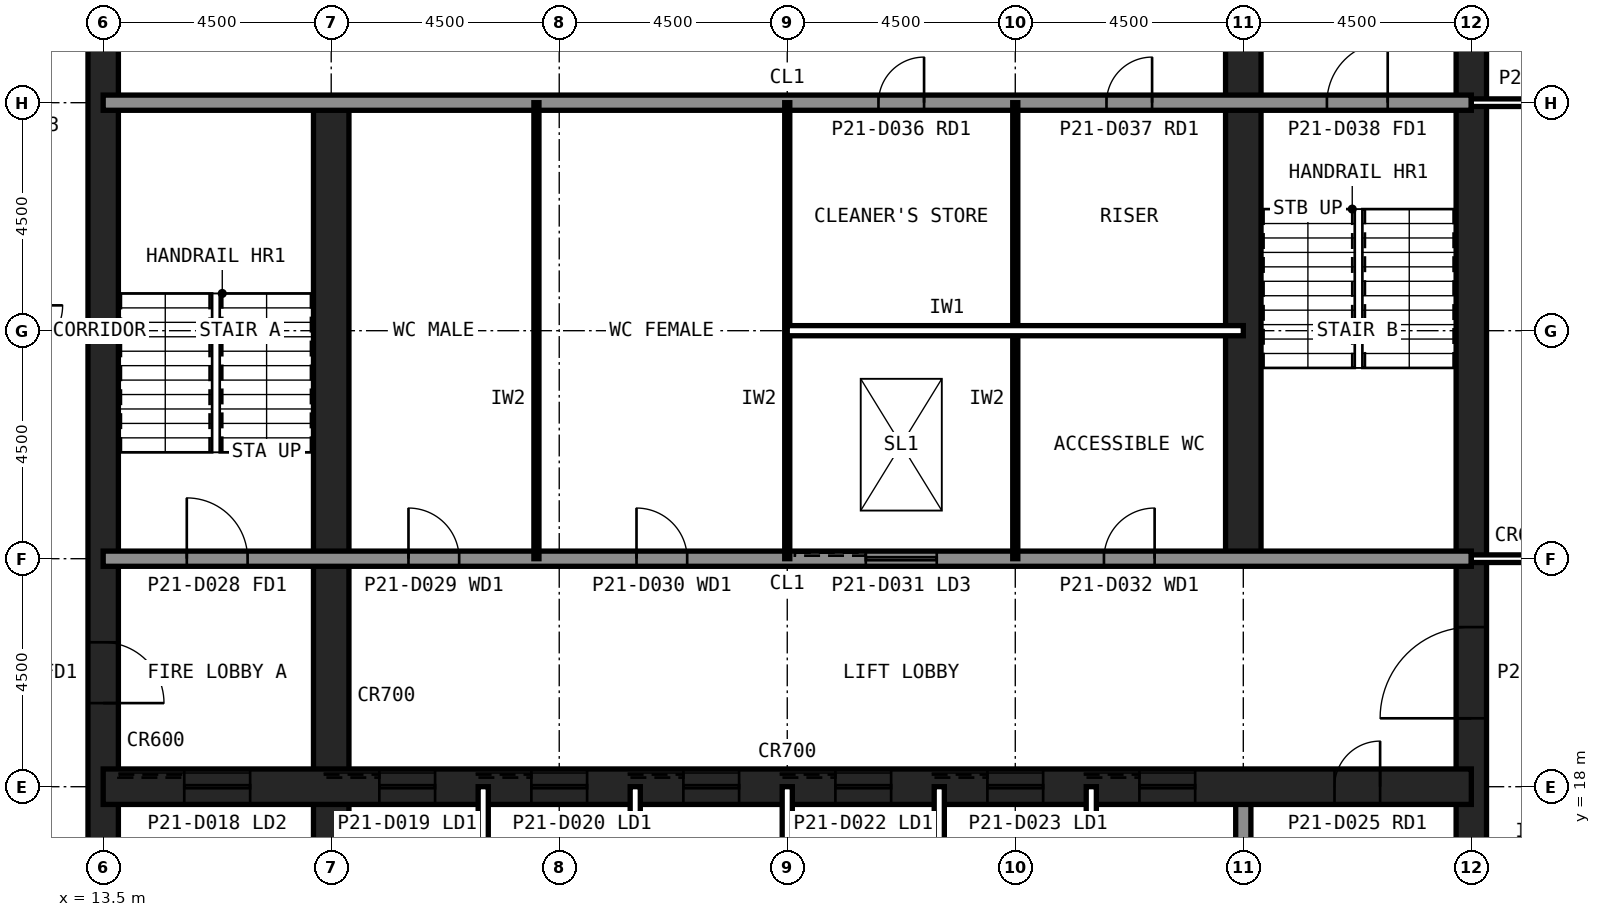
"""IFC4 building model, lengths in metres.
Left out: names, types, materials, properties, quantities, classifications, styles, units other than length and angle.
Written with IfcOpenShell. Run it as: python <this file> out.ifc"""

import sys

from ifc_helpers import new_model, si_unit, direction, frame, frame_2d, origin, place, context, subcontext, project, spatial, rectangle, extrude, element, fill, save


model = new_model("IFC4")
c1 = context("Model", 3, precision=1e-05, world=origin(), true_north=direction((0.0, 1.0)))
c2 = subcontext(c1, "Body", "Model", "MODEL_VIEW")
j1 = project(units=[si_unit("LENGTHUNIT", "METRE"), si_unit("PLANEANGLEUNIT", "RADIAN")], contexts=[c1])
p1 = place(None, origin())
s1 = spatial("IfcSite", under=j1, at=p1, CompositionType="ELEMENT")
p2 = place(p1, origin())
s2 = spatial("IfcBuilding", under=s1, at=p2, CompositionType="ELEMENT")
p3 = place(p2, frame((0.0, 0.0, 87.8)))
s3 = spatial("IfcBuildingStorey", under=s2, at=p3, CompositionType="ELEMENT", Elevation=87.8)
p4 = place(p3, frame((40.5, 13.5, 0.0), z_axis=(0.0, 0.0, 1.0), x_axis=(0.0, 1.0, 0.0)))
e1 = element("IfcWall", 1, at=p4, inside=s3, PredefinedType="SHEAR", context=c2, shape_type="SweptSolid", body=[
    extrude(rectangle(XDim=27.0, YDim=0.6, at=frame_2d((13.5, 0.0))), origin(), (0.0, 0.0, 1.0), 4.2),
])
p5 = place(p4, frame((5.85, 0.0, 0.0)))
e2 = element("IfcOpeningElement", 2, at=p5, cuts=e1, PredefinedType="OPENING", context=c2, shape_type="SweptSolid", body=[
    extrude(rectangle(XDim=1.8, YDim=2.1, at=frame_2d((0.9, 1.05))), frame((0.0, 0.31, 0.0), z_axis=(0.0, -1.0, 0.0), x_axis=(1.0, 0.0, 0.0)), (0.0, 0.0, 1.0), 0.62),
])
p6 = place(p4, frame((19.65, 0.0, 0.0)))
e3 = element("IfcOpeningElement", 3, at=p6, cuts=e1, PredefinedType="OPENING", context=c2, shape_type="SweptSolid", body=[
    extrude(rectangle(XDim=1.2, YDim=2.1, at=frame_2d((0.6, 1.05))), frame((0.0, 0.31, 0.0), z_axis=(0.0, -1.0, 0.0), x_axis=(1.0, 0.0, 0.0)), (0.0, 0.0, 1.0), 0.62),
])
p7 = place(p3, frame((13.5, 40.5, 0.0), z_axis=(0.0, 0.0, 1.0), x_axis=(0.0, -1.0, 0.0)))
e4 = element("IfcWall", 4, at=p7, inside=s3, PredefinedType="SHEAR", context=c2, shape_type="SweptSolid", body=[
    extrude(rectangle(XDim=27.0, YDim=0.6, at=frame_2d((13.5, 0.0))), origin(), (0.0, 0.0, 1.0), 4.2),
])
p8 = place(p7, frame((19.65, 0.0, 0.0)))
e5 = element("IfcOpeningElement", 5, at=p8, cuts=e4, PredefinedType="OPENING", context=c2, shape_type="SweptSolid", body=[
    extrude(rectangle(XDim=1.2, YDim=2.1, at=frame_2d((0.6, 1.05))), frame((0.0, 0.31, 0.0), z_axis=(0.0, -1.0, 0.0), x_axis=(1.0, 0.0, 0.0)), (0.0, 0.0, 1.0), 0.62),
])
p9 = place(p7, frame((5.85, 0.0, 0.0)))
e6 = element("IfcOpeningElement", 6, at=p9, cuts=e4, PredefinedType="OPENING", context=c2, shape_type="SweptSolid", body=[
    extrude(rectangle(XDim=1.8, YDim=2.1, at=frame_2d((0.9, 1.05))), frame((0.0, 0.31, 0.0), z_axis=(0.0, -1.0, 0.0), x_axis=(1.0, 0.0, 0.0)), (0.0, 0.0, 1.0), 0.62),
])
p10 = place(p3, frame((18.0, 13.5, 0.0), z_axis=(0.0, 0.0, 1.0), x_axis=(0.0, 1.0, 0.0)))
e7 = element("IfcWall", 7, at=p10, inside=s3, PredefinedType="SHEAR", context=c2, shape_type="SweptSolid", body=[
    extrude(rectangle(XDim=18.0, YDim=0.7, at=frame_2d((9.0, 0.0))), origin(), (0.0, 0.0, 1.0), 4.2),
])
p11 = place(p3, frame((36.0, 13.5, 0.0), z_axis=(0.0, 0.0, 1.0), x_axis=(0.0, 1.0, 0.0)))
e8 = element("IfcWall", 8, at=p11, inside=s3, PredefinedType="SOLIDWALL", context=c2, shape_type="SweptSolid", body=[
    extrude(rectangle(XDim=4.5, YDim=0.3, at=frame_2d((2.25, 0.0))), origin(), (0.0, 0.0, 1.0), 4.04),
])
p12 = place(p3, frame((36.0, 22.5, 0.0), z_axis=(0.0, 0.0, 1.0), x_axis=(0.0, 1.0, 0.0)))
e9 = element("IfcWall", 9, at=p12, inside=s3, PredefinedType="SHEAR", context=c2, shape_type="SweptSolid", body=[
    extrude(rectangle(XDim=18.0, YDim=0.7, at=frame_2d((9.0, 0.0))), origin(), (0.0, 0.0, 1.0), 4.2),
])
p13 = place(p3, frame((13.5, 18.0, 0.0), z_axis=(0.0, 0.0, 1.0), x_axis=(1.0, 0.0, 0.0)))
e10 = element("IfcWall", 10, at=p13, inside=s3, PredefinedType="SHEAR", context=c2, shape_type="SweptSolid", body=[
    extrude(rectangle(XDim=27.0, YDim=0.7, at=frame_2d((13.5, 0.0))), origin(), (0.0, 0.0, 1.0), 4.2),
])
p14 = place(p13, frame((24.3, 0.0, 0.0)))
e11 = element("IfcOpeningElement", 11, at=p14, cuts=e10, PredefinedType="OPENING", context=c2, shape_type="SweptSolid", body=[
    extrude(rectangle(XDim=0.9, YDim=2.1, at=frame_2d((0.45, 1.05))), frame((0.0, 0.36, 0.0), z_axis=(0.0, -1.0, 0.0), x_axis=(1.0, 0.0, 0.0)), (0.0, 0.0, 1.0), 0.72),
])
p15 = place(p13, frame((5.45, 0.0, 0.0)))
e12 = element("IfcOpeningElement", 12, at=p15, cuts=e10, PredefinedType="OPENING", context=c2, shape_type="SweptSolid", body=[
    extrude(rectangle(XDim=1.1, YDim=2.1, at=frame_2d((0.55, 1.05))), frame((0.0, 0.36, 0.0), z_axis=(0.0, -1.0, 0.0), x_axis=(1.0, 0.0, 0.0)), (0.0, 0.0, 1.0), 0.72),
])
p16 = place(p13, frame((8.45, 0.0, 0.0)))
e13 = element("IfcOpeningElement", 13, at=p16, cuts=e10, PredefinedType="OPENING", context=c2, shape_type="SweptSolid", body=[
    extrude(rectangle(XDim=1.1, YDim=2.1, at=frame_2d((0.55, 1.05))), frame((0.0, 0.36, 0.0), z_axis=(0.0, -1.0, 0.0), x_axis=(1.0, 0.0, 0.0)), (0.0, 0.0, 1.0), 0.72),
])
p17 = place(p13, frame((11.45, 0.0, 0.0)))
e14 = element("IfcOpeningElement", 14, at=p17, cuts=e10, PredefinedType="OPENING", context=c2, shape_type="SweptSolid", body=[
    extrude(rectangle(XDim=1.1, YDim=2.1, at=frame_2d((0.55, 1.05))), frame((0.0, 0.36, 0.0), z_axis=(0.0, -1.0, 0.0), x_axis=(1.0, 0.0, 0.0)), (0.0, 0.0, 1.0), 0.72),
])
p18 = place(p13, frame((14.45, 0.0, 0.0)))
e15 = element("IfcOpeningElement", 15, at=p18, cuts=e10, PredefinedType="OPENING", context=c2, shape_type="SweptSolid", body=[
    extrude(rectangle(XDim=1.1, YDim=2.1, at=frame_2d((0.55, 1.05))), frame((0.0, 0.36, 0.0), z_axis=(0.0, -1.0, 0.0), x_axis=(1.0, 0.0, 0.0)), (0.0, 0.0, 1.0), 0.72),
])
p19 = place(p13, frame((17.45, 0.0, 0.0)))
e16 = element("IfcOpeningElement", 16, at=p19, cuts=e10, PredefinedType="OPENING", context=c2, shape_type="SweptSolid", body=[
    extrude(rectangle(XDim=1.1, YDim=2.1, at=frame_2d((0.55, 1.05))), frame((0.0, 0.36, 0.0), z_axis=(0.0, -1.0, 0.0), x_axis=(1.0, 0.0, 0.0)), (0.0, 0.0, 1.0), 0.72),
])
p20 = place(p13, frame((20.45, 0.0, 0.0)))
e17 = element("IfcOpeningElement", 17, at=p20, cuts=e10, PredefinedType="OPENING", context=c2, shape_type="SweptSolid", body=[
    extrude(rectangle(XDim=1.1, YDim=2.1, at=frame_2d((0.55, 1.05))), frame((0.0, 0.36, 0.0), z_axis=(0.0, -1.0, 0.0), x_axis=(1.0, 0.0, 0.0)), (0.0, 0.0, 1.0), 0.72),
])
p21 = place(p13, frame((1.6, 0.0, 0.0)))
e18 = element("IfcOpeningElement", 18, at=p21, cuts=e10, PredefinedType="OPENING", context=c2, shape_type="SweptSolid", body=[
    extrude(rectangle(XDim=1.3, YDim=2.2, at=frame_2d((0.65, 1.1))), frame((0.0, 0.36, 0.0), z_axis=(0.0, -1.0, 0.0), x_axis=(1.0, 0.0, 0.0)), (0.0, 0.0, 1.0), 0.72),
])
p22 = place(p3, frame((13.5, 22.5, 0.0), z_axis=(0.0, 0.0, 1.0), x_axis=(1.0, 0.0, 0.0)))
e19 = element("IfcWall", 19, at=p22, inside=s3, PredefinedType="SOLIDWALL", context=c2, shape_type="SweptSolid", body=[
    extrude(rectangle(XDim=27.0, YDim=0.3, at=frame_2d((13.5, 0.0))), origin(), (0.0, 0.0, 1.0), 4.04),
])
p23 = place(p22, frame((1.65, 0.0, 0.0)))
e20 = element("IfcOpeningElement", 20, at=p23, cuts=e19, PredefinedType="OPENING", context=c2, shape_type="SweptSolid", body=[
    extrude(rectangle(XDim=1.2, YDim=2.1, at=frame_2d((0.6, 1.05))), frame((0.0, 0.16, 0.0), z_axis=(0.0, -1.0, 0.0), x_axis=(1.0, 0.0, 0.0)), (0.0, 0.0, 1.0), 0.32),
])
p24 = place(p22, frame((6.025, 0.0, 0.0)))
e21 = element("IfcOpeningElement", 21, at=p24, cuts=e19, PredefinedType="OPENING", context=c2, shape_type="SweptSolid", body=[
    extrude(rectangle(XDim=1.0, YDim=2.1, at=frame_2d((0.5, 1.05))), frame((0.0, 0.16, 0.0), z_axis=(0.0, -1.0, 0.0), x_axis=(1.0, 0.0, 0.0)), (0.0, 0.0, 1.0), 0.32),
])
p25 = place(p22, frame((10.525, 0.0, 0.0)))
e22 = element("IfcOpeningElement", 22, at=p25, cuts=e19, PredefinedType="OPENING", context=c2, shape_type="SweptSolid", body=[
    extrude(rectangle(XDim=1.0, YDim=2.1, at=frame_2d((0.5, 1.05))), frame((0.0, 0.16, 0.0), z_axis=(0.0, -1.0, 0.0), x_axis=(1.0, 0.0, 0.0)), (0.0, 0.0, 1.0), 0.32),
])
p26 = place(p22, frame((19.75, 0.0, 0.0)))
e23 = element("IfcOpeningElement", 23, at=p26, cuts=e19, PredefinedType="OPENING", context=c2, shape_type="SweptSolid", body=[
    extrude(rectangle(XDim=1.0, YDim=2.1, at=frame_2d((0.5, 1.05))), frame((0.0, 0.16, 0.0), z_axis=(0.0, -1.0, 0.0), x_axis=(1.0, 0.0, 0.0)), (0.0, 0.0, 1.0), 0.32),
])
p27 = place(p22, frame((15.05, 0.0, 0.0)))
e24 = element("IfcOpeningElement", 24, at=p27, cuts=e19, PredefinedType="OPENING", context=c2, shape_type="SweptSolid", body=[
    extrude(rectangle(XDim=1.4, YDim=2.4, at=frame_2d((0.7, 1.2))), frame((0.0, 0.16, 0.0), z_axis=(0.0, -1.0, 0.0), x_axis=(1.0, 0.0, 0.0)), (0.0, 0.0, 1.0), 0.32),
])
p28 = place(p3, frame((13.5, 31.5, 0.0), z_axis=(0.0, 0.0, 1.0), x_axis=(1.0, 0.0, 0.0)))
e25 = element("IfcWall", 25, at=p28, inside=s3, PredefinedType="SOLIDWALL", context=c2, shape_type="SweptSolid", body=[
    extrude(rectangle(XDim=27.0, YDim=0.3, at=frame_2d((13.5, 0.0))), origin(), (0.0, 0.0, 1.0), 4.04),
])
p29 = place(p28, frame((24.15, 0.0, 0.0)))
e26 = element("IfcOpeningElement", 26, at=p29, cuts=e25, PredefinedType="OPENING", context=c2, shape_type="SweptSolid", body=[
    extrude(rectangle(XDim=1.2, YDim=2.1, at=frame_2d((0.6, 1.05))), frame((0.0, 0.16, 0.0), z_axis=(0.0, -1.0, 0.0), x_axis=(1.0, 0.0, 0.0)), (0.0, 0.0, 1.0), 0.32),
])
p30 = place(p28, frame((15.3, 0.0, 0.0)))
e27 = element("IfcOpeningElement", 27, at=p30, cuts=e25, PredefinedType="OPENING", context=c2, shape_type="SweptSolid", body=[
    extrude(rectangle(XDim=0.9, YDim=2.1, at=frame_2d((0.45, 1.05))), frame((0.0, 0.16, 0.0), z_axis=(0.0, -1.0, 0.0), x_axis=(1.0, 0.0, 0.0)), (0.0, 0.0, 1.0), 0.32),
])
p31 = place(p28, frame((19.8, 0.0, 0.0)))
e28 = element("IfcOpeningElement", 28, at=p31, cuts=e25, PredefinedType="OPENING", context=c2, shape_type="SweptSolid", body=[
    extrude(rectangle(XDim=0.9, YDim=2.1, at=frame_2d((0.45, 1.05))), frame((0.0, 0.16, 0.0), z_axis=(0.0, -1.0, 0.0), x_axis=(1.0, 0.0, 0.0)), (0.0, 0.0, 1.0), 0.32),
])
for number, where, z_axis, x_axis in (
    (29, (21.0, 13.5, 0.0), (0.0, 0.0, 1.0), (0.0, 1.0, 0.0)),
    (30, (24.0, 13.5, 0.0), (0.0, 0.0, 1.0), (0.0, 1.0, 0.0)),
    (31, (27.0, 13.5, 0.0), (0.0, 0.0, 1.0), (0.0, 1.0, 0.0)),
    (32, (30.0, 13.5, 0.0), (0.0, 0.0, 1.0), (0.0, 1.0, 0.0)),
    (33, (33.0, 13.5, 0.0), (0.0, 0.0, 1.0), (0.0, 1.0, 0.0)),
):
    element("IfcWall", number, at=place(p3, frame(where, z_axis=z_axis, x_axis=x_axis)), inside=s3, PredefinedType="PARTITIONING", context=c2, shape_type="SweptSolid", body=[
        extrude(rectangle(XDim=4.5, YDim=0.2, at=frame_2d((2.25, 0.0))), origin(), (0.0, 0.0, 1.0), 4.04),
    ])
for number, where, z_axis, x_axis in (
    (34, (22.05, 22.5, 0.0), (0.0, 0.0, 1.0), (0.0, 1.0, 0.0)),
    (35, (27.0, 22.5, 0.0), (0.0, 0.0, 1.0), (0.0, 1.0, 0.0)),
    (36, (31.5, 22.5, 0.0), (0.0, 0.0, 1.0), (0.0, 1.0, 0.0)),
):
    element("IfcWall", number, at=place(p3, frame(where, z_axis=z_axis, x_axis=x_axis)), inside=s3, PredefinedType="PLUMBINGWALL", context=c2, shape_type="SweptSolid", body=[
        extrude(rectangle(XDim=9.0, YDim=0.1, at=frame_2d((4.5, 0.0))), origin(), (0.0, 0.0, 1.0), 4.04),
    ])
p32 = place(p3, frame((27.0, 27.0, 0.0), z_axis=(0.0, 0.0, 1.0), x_axis=(1.0, 0.0, 0.0)))
e37 = element("IfcWall", 37, at=p32, inside=s3, PredefinedType="PARTITIONING", context=c2, shape_type="SweptSolid", body=[
    extrude(rectangle(XDim=9.0, YDim=0.2, at=frame_2d((4.5, 0.0))), origin(), (0.0, 0.0, 1.0), 4.04),
])
p33 = place(p3, frame((40.5, 22.5, 0.0), z_axis=(0.0, 0.0, 1.0), x_axis=(1.0, 0.0, 0.0)))
e38 = element("IfcWall", 38, at=p33, inside=s3, PredefinedType="PARTITIONING", context=c2, shape_type="SweptSolid", body=[
    extrude(rectangle(XDim=3.6, YDim=0.15, at=frame_2d((1.8, 0.0))), origin(), (0.0, 0.0, 1.0), 3.189),
])
p34 = place(p3, frame((44.1, 31.5, 0.0), z_axis=(0.0, 0.0, 1.0), x_axis=(-1.0, 0.0, 0.0)))
e39 = element("IfcWall", 39, at=p34, inside=s3, PredefinedType="PARTITIONING", context=c2, shape_type="SweptSolid", body=[
    extrude(rectangle(XDim=3.6, YDim=0.15, at=frame_2d((1.8, 0.0))), origin(), (0.0, 0.0, 1.0), 3.189),
])
p35 = place(p34, frame((1.3, 0.0, 0.0)))
e40 = element("IfcOpeningElement", 40, at=p35, cuts=e39, PredefinedType="OPENING", context=c2, shape_type="SweptSolid", body=[
    extrude(rectangle(XDim=1.0, YDim=2.1, at=frame_2d((0.5, 1.05))), frame((0.0, 0.085, 0.0), z_axis=(0.0, -1.0, 0.0), x_axis=(1.0, 0.0, 0.0)), (0.0, 0.0, 1.0), 0.17),
])
p36 = place(p8, origin())
e41 = element("IfcDoor", 41, at=p36, inside=s3, OperationType="SINGLE_SWING_RIGHT", PredefinedType="DOOR", context=c2, shape_type="SweptSolid", body=[
    extrude(rectangle(XDim=1.2, YDim=2.1, at=frame_2d((0.6, 1.05))), frame((0.0, 0.025, 0.0), z_axis=(0.0, -1.0, 0.0), x_axis=(1.0, 0.0, 0.0)), (0.0, 0.0, 1.0), 0.05),
])
fill(e5, e41)
p37 = place(p5, origin())
e42 = element("IfcDoor", 42, at=p37, inside=s3, OperationType="SINGLE_SWING_LEFT", PredefinedType="DOOR", context=c2, shape_type="SweptSolid", body=[
    extrude(rectangle(XDim=1.8, YDim=2.1, at=frame_2d((0.9, 1.05))), frame((0.0, 0.025, 0.0), z_axis=(0.0, -1.0, 0.0), x_axis=(1.0, 0.0, 0.0)), (0.0, 0.0, 1.0), 0.05),
])
fill(e2, e42)
p38 = place(p23, origin())
e43 = element("IfcDoor", 43, at=p38, inside=s3, OperationType="SINGLE_SWING_LEFT", PredefinedType="DOOR", context=c2, shape_type="SweptSolid", body=[
    extrude(rectangle(XDim=1.2, YDim=2.1, at=frame_2d((0.6, 1.05))), frame((0.0, 0.025, 0.0), z_axis=(0.0, -1.0, 0.0), x_axis=(1.0, 0.0, 0.0)), (0.0, 0.0, 1.0), 0.05),
])
fill(e20, e43)
p39 = place(p29, origin())
e44 = element("IfcDoor", 44, at=p39, inside=s3, OperationType="SINGLE_SWING_RIGHT", PredefinedType="DOOR", context=c2, shape_type="SweptSolid", body=[
    extrude(rectangle(XDim=1.2, YDim=2.1, at=frame_2d((0.6, 1.05))), frame((0.0, 0.025, 0.0), z_axis=(0.0, -1.0, 0.0), x_axis=(1.0, 0.0, 0.0)), (0.0, 0.0, 1.0), 0.05),
])
fill(e26, e44)
p40 = place(p24, origin())
e45 = element("IfcDoor", 45, at=p40, inside=s3, OperationType="SINGLE_SWING_LEFT", PredefinedType="DOOR", context=c2, shape_type="SweptSolid", body=[
    extrude(rectangle(XDim=1.0, YDim=2.1, at=frame_2d((0.5, 1.05))), frame((0.0, 0.025, 0.0), z_axis=(0.0, -1.0, 0.0), x_axis=(1.0, 0.0, 0.0)), (0.0, 0.0, 1.0), 0.05),
])
fill(e21, e45)
p41 = place(p25, origin())
e46 = element("IfcDoor", 46, at=p41, inside=s3, OperationType="SINGLE_SWING_LEFT", PredefinedType="DOOR", context=c2, shape_type="SweptSolid", body=[
    extrude(rectangle(XDim=1.0, YDim=2.1, at=frame_2d((0.5, 1.05))), frame((0.0, 0.025, 0.0), z_axis=(0.0, -1.0, 0.0), x_axis=(1.0, 0.0, 0.0)), (0.0, 0.0, 1.0), 0.05),
])
fill(e22, e46)
p42 = place(p26, origin())
e47 = element("IfcDoor", 47, at=p42, inside=s3, OperationType="SINGLE_SWING_RIGHT", PredefinedType="DOOR", context=c2, shape_type="SweptSolid", body=[
    extrude(rectangle(XDim=1.0, YDim=2.1, at=frame_2d((0.5, 1.05))), frame((0.0, 0.025, 0.0), z_axis=(0.0, -1.0, 0.0), x_axis=(1.0, 0.0, 0.0)), (0.0, 0.0, 1.0), 0.05),
])
fill(e23, e47)
p43 = place(p30, origin())
e48 = element("IfcDoor", 48, at=p43, inside=s3, OperationType="SINGLE_SWING_RIGHT", PredefinedType="DOOR", context=c2, shape_type="SweptSolid", body=[
    extrude(rectangle(XDim=0.9, YDim=2.1, at=frame_2d((0.45, 1.05))), frame((0.0, 0.025, 0.0), z_axis=(0.0, -1.0, 0.0), x_axis=(1.0, 0.0, 0.0)), (0.0, 0.0, 1.0), 0.05),
])
fill(e27, e48)
p44 = place(p31, origin())
e49 = element("IfcDoor", 49, at=p44, inside=s3, OperationType="SINGLE_SWING_RIGHT", PredefinedType="DOOR", context=c2, shape_type="SweptSolid", body=[
    extrude(rectangle(XDim=0.9, YDim=2.1, at=frame_2d((0.45, 1.05))), frame((0.0, 0.025, 0.0), z_axis=(0.0, -1.0, 0.0), x_axis=(1.0, 0.0, 0.0)), (0.0, 0.0, 1.0), 0.05),
])
fill(e28, e49)
p45 = place(p14, origin())
e50 = element("IfcDoor", 50, at=p45, inside=s3, OperationType="SINGLE_SWING_RIGHT", PredefinedType="DOOR", context=c2, shape_type="SweptSolid", body=[
    extrude(rectangle(XDim=0.9, YDim=2.1, at=frame_2d((0.45, 1.05))), frame((0.0, 0.025, 0.0), z_axis=(0.0, -1.0, 0.0), x_axis=(1.0, 0.0, 0.0)), (0.0, 0.0, 1.0), 0.05),
])
fill(e11, e50)
p46 = place(p15, origin())
e51 = element("IfcDoor", 51, at=p46, inside=s3, OperationType="SLIDING_TO_LEFT", PredefinedType="DOOR", context=c2, shape_type="SweptSolid", body=[
    extrude(rectangle(XDim=1.1, YDim=2.1, at=frame_2d((0.55, 1.05))), frame((0.0, 0.025, 0.0), z_axis=(0.0, -1.0, 0.0), x_axis=(1.0, 0.0, 0.0)), (0.0, 0.0, 1.0), 0.05),
])
fill(e12, e51)
p47 = place(p16, origin())
e52 = element("IfcDoor", 52, at=p47, inside=s3, OperationType="SLIDING_TO_LEFT", PredefinedType="DOOR", context=c2, shape_type="SweptSolid", body=[
    extrude(rectangle(XDim=1.1, YDim=2.1, at=frame_2d((0.55, 1.05))), frame((0.0, 0.025, 0.0), z_axis=(0.0, -1.0, 0.0), x_axis=(1.0, 0.0, 0.0)), (0.0, 0.0, 1.0), 0.05),
])
fill(e13, e52)
p48 = place(p17, origin())
e53 = element("IfcDoor", 53, at=p48, inside=s3, OperationType="SLIDING_TO_LEFT", PredefinedType="DOOR", context=c2, shape_type="SweptSolid", body=[
    extrude(rectangle(XDim=1.1, YDim=2.1, at=frame_2d((0.55, 1.05))), frame((0.0, 0.025, 0.0), z_axis=(0.0, -1.0, 0.0), x_axis=(1.0, 0.0, 0.0)), (0.0, 0.0, 1.0), 0.05),
])
fill(e14, e53)
p49 = place(p18, origin())
e54 = element("IfcDoor", 54, at=p49, inside=s3, OperationType="SLIDING_TO_LEFT", PredefinedType="DOOR", context=c2, shape_type="SweptSolid", body=[
    extrude(rectangle(XDim=1.1, YDim=2.1, at=frame_2d((0.55, 1.05))), frame((0.0, 0.025, 0.0), z_axis=(0.0, -1.0, 0.0), x_axis=(1.0, 0.0, 0.0)), (0.0, 0.0, 1.0), 0.05),
])
fill(e15, e54)
p50 = place(p19, origin())
e55 = element("IfcDoor", 55, at=p50, inside=s3, OperationType="SLIDING_TO_LEFT", PredefinedType="DOOR", context=c2, shape_type="SweptSolid", body=[
    extrude(rectangle(XDim=1.1, YDim=2.1, at=frame_2d((0.55, 1.05))), frame((0.0, 0.025, 0.0), z_axis=(0.0, -1.0, 0.0), x_axis=(1.0, 0.0, 0.0)), (0.0, 0.0, 1.0), 0.05),
])
fill(e16, e55)
p51 = place(p20, origin())
e56 = element("IfcDoor", 56, at=p51, inside=s3, OperationType="SLIDING_TO_LEFT", PredefinedType="DOOR", context=c2, shape_type="SweptSolid", body=[
    extrude(rectangle(XDim=1.1, YDim=2.1, at=frame_2d((0.55, 1.05))), frame((0.0, 0.025, 0.0), z_axis=(0.0, -1.0, 0.0), x_axis=(1.0, 0.0, 0.0)), (0.0, 0.0, 1.0), 0.05),
])
fill(e17, e56)
p52 = place(p21, origin())
e57 = element("IfcDoor", 57, at=p52, inside=s3, OperationType="SLIDING_TO_LEFT", PredefinedType="DOOR", context=c2, shape_type="SweptSolid", body=[
    extrude(rectangle(XDim=1.3, YDim=2.2, at=frame_2d((0.65, 1.1))), frame((0.0, 0.025, 0.0), z_axis=(0.0, -1.0, 0.0), x_axis=(1.0, 0.0, 0.0)), (0.0, 0.0, 1.0), 0.05),
])
fill(e18, e57)
p53 = place(p27, origin())
e58 = element("IfcDoor", 58, at=p53, inside=s3, OperationType="SLIDING_TO_LEFT", PredefinedType="DOOR", context=c2, shape_type="SweptSolid", body=[
    extrude(rectangle(XDim=1.4, YDim=2.4, at=frame_2d((0.7, 1.2))), frame((0.0, 0.025, 0.0), z_axis=(0.0, -1.0, 0.0), x_axis=(1.0, 0.0, 0.0)), (0.0, 0.0, 1.0), 0.05),
])
fill(e24, e58)
save(model, sys.argv[1])
